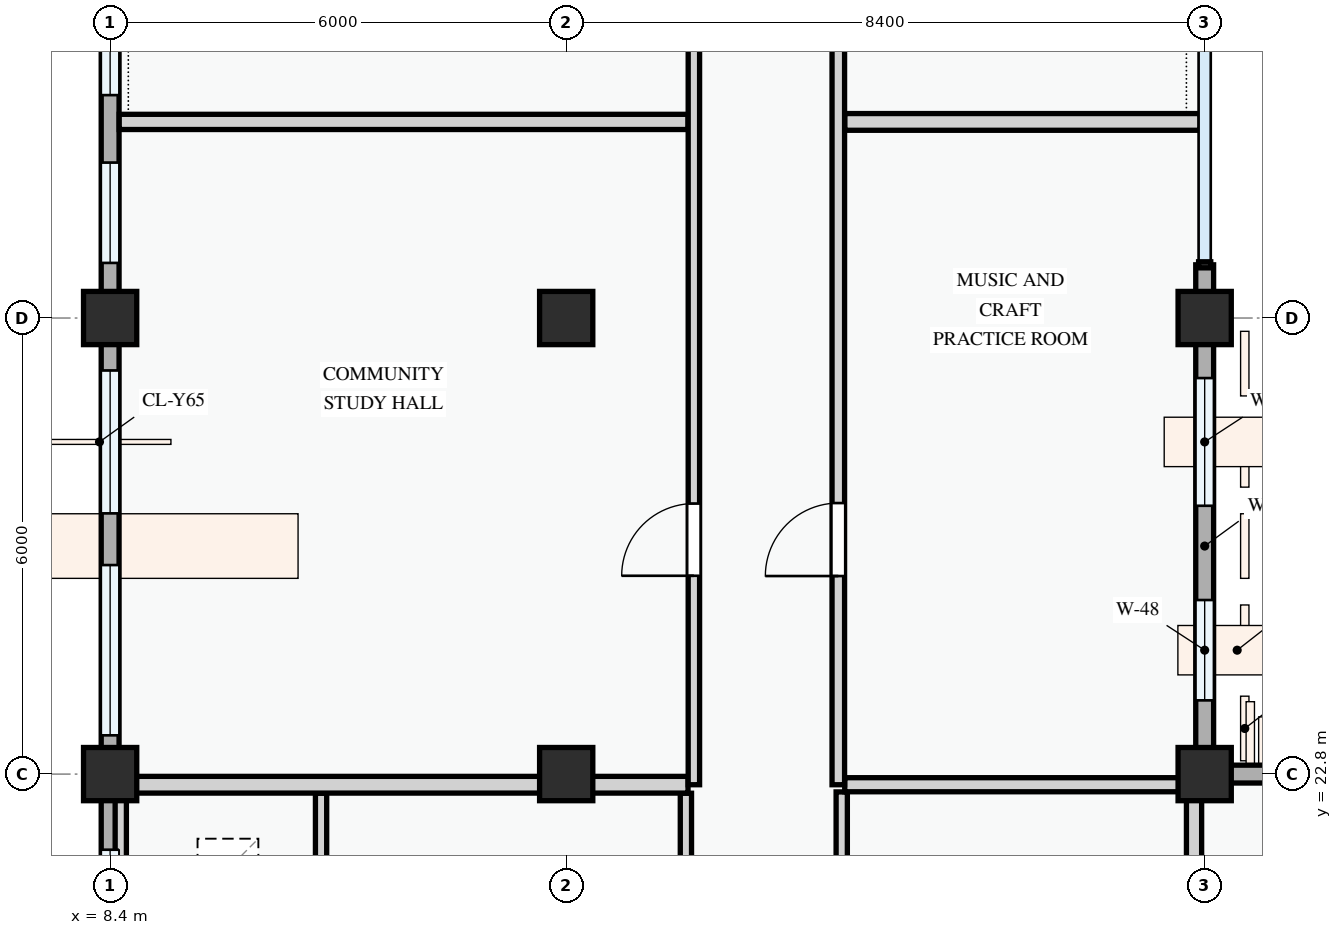
"""IFC4 building model, lengths in metres.
Left out: names, types, materials, properties, quantities, classifications, styles, units other than length and angle.
Written with IfcOpenShell. Run it as: python <this file> out.ifc"""

import sys

from ifc_helpers import new_model, si_unit, direction, frame, frame_2d, origin, origin_2d, place, context, subcontext, project, spatial, rectangle, extrude, element, fill, save


model = new_model("IFC4")
c1 = context("Model", 3, precision=1e-05, world=origin(), true_north=direction((0.0, 1.0)))
c2 = subcontext(c1, "Body", "Model", "MODEL_VIEW")
j1 = project(units=[si_unit("LENGTHUNIT", "METRE"), si_unit("PLANEANGLEUNIT", "RADIAN")], contexts=[c1])
p1 = place(None, origin())
s1 = spatial("IfcSite", under=j1, at=p1, CompositionType="ELEMENT")
p2 = place(p1, origin())
s2 = spatial("IfcBuilding", under=s1, at=p2, CompositionType="ELEMENT")
p3 = place(p2, frame((0.0, 0.0, 4.5)))
s3 = spatial("IfcBuildingStorey", under=s2, at=p3, CompositionType="ELEMENT", Elevation=4.5)
for number, where, z_axis, x_axis in (
    (1, (8.4, 22.8, 0.0), (0.0, 0.0, 1.0), (1.0, 0.0, 0.0)),
    (2, (8.4, 28.8, 0.0), (0.0, 0.0, 1.0), (1.0, 0.0, 0.0)),
    (3, (14.4, 22.8, 0.0), (0.0, 0.0, 1.0), (1.0, 0.0, 0.0)),
    (4, (14.4, 28.8, 0.0), (0.0, 0.0, 1.0), (1.0, 0.0, 0.0)),
    (5, (22.8, 22.8, 0.0), (0.0, 0.0, 1.0), (1.0, 0.0, 0.0)),
    (6, (22.8, 28.8, 0.0), (0.0, 0.0, 1.0), (1.0, 0.0, 0.0)),
):
    element("IfcColumn", number, at=place(p3, frame(where, z_axis=z_axis, x_axis=x_axis)), inside=s3, PredefinedType="COLUMN", context=c2, shape_type="SweptSolid", body=[
        extrude(rectangle(XDim=0.7, YDim=0.7, at=origin_2d()), origin(), (0.0, 0.0, 1.0), 3.6),
    ])
p4 = place(p3, frame((22.8, 22.8, 0.0), z_axis=(0.0, 0.0, 1.0), x_axis=(0.0, 1.0, 0.0)))
e7 = element("IfcWall", 7, at=p4, inside=s3, PredefinedType="STANDARD", context=c2, shape_type="SweptSolid", body=[
    extrude(rectangle(XDim=6.0, YDim=0.235, at=frame_2d((3.0, 0.0))), origin(), (0.0, 0.0, 1.0), 2.875),
])
p5 = place(p4, frame((0.97, 0.0, 0.78)))
e8 = element("IfcOpeningElement", 8, at=p5, cuts=e7, PredefinedType="OPENING", context=c2, shape_type="SweptSolid", body=[
    extrude(rectangle(XDim=1.32, YDim=1.35, at=frame_2d((0.66, 0.675))), frame((0.0, 0.127, 0.0), z_axis=(0.0, -1.0, 0.0), x_axis=(1.0, 0.0, 0.0)), (0.0, 0.0, 1.0), 0.255),
])
p6 = place(p4, frame((3.53, 0.0, 0.78)))
e9 = element("IfcOpeningElement", 9, at=p6, cuts=e7, PredefinedType="OPENING", context=c2, shape_type="SweptSolid", body=[
    extrude(rectangle(XDim=1.68, YDim=1.46, at=frame_2d((0.84, 0.73))), frame((0.0, 0.127, 0.0), z_axis=(0.0, -1.0, 0.0), x_axis=(1.0, 0.0, 0.0)), (0.0, 0.0, 1.0), 0.255),
])
p7 = place(p3, frame((22.8, 28.8, 0.0), z_axis=(0.0, 0.0, 1.0), x_axis=(0.0, 1.0, 0.0)))
e10 = element("IfcWall", 10, at=p7, inside=s3, PredefinedType="STANDARD", context=c2, shape_type="SweptSolid", body=[
    extrude(rectangle(XDim=0.7, YDim=0.235, at=frame_2d((0.35, 0.0))), origin(), (0.0, 0.0, 1.0), 2.725),
])
p8 = place(p3, frame((8.4, 37.2, 0.0), z_axis=(0.0, 0.0, 1.0), x_axis=(0.0, -1.0, 0.0)))
e11 = element("IfcWall", 11, at=p8, inside=s3, PredefinedType="STANDARD", context=c2, shape_type="SweptSolid", body=[
    extrude(rectangle(XDim=8.4, YDim=0.235, at=frame_2d((4.2, 0.0))), origin(), (0.0, 0.0, 1.0), 2.725),
])
p9 = place(p8, frame((0.722, 0.0, 0.78)))
e12 = element("IfcOpeningElement", 12, at=p9, cuts=e11, PredefinedType="OPENING", context=c2, shape_type="SweptSolid", body=[
    extrude(rectangle(XDim=1.82, YDim=1.46, at=frame_2d((0.91, 0.73))), frame((0.0, 0.127, 0.0), z_axis=(0.0, -1.0, 0.0), x_axis=(1.0, 0.0, 0.0)), (0.0, 0.0, 1.0), 0.255),
])
p10 = place(p8, frame((3.288, 0.0, 0.78)))
e13 = element("IfcOpeningElement", 13, at=p10, cuts=e11, PredefinedType="OPENING", context=c2, shape_type="SweptSolid", body=[
    extrude(rectangle(XDim=2.18, YDim=1.48, at=frame_2d((1.09, 0.74))), frame((0.0, 0.127, 0.0), z_axis=(0.0, -1.0, 0.0), x_axis=(1.0, 0.0, 0.0)), (0.0, 0.0, 1.0), 0.255),
])
p11 = place(p8, frame((6.355, 0.0, 0.78)))
e14 = element("IfcOpeningElement", 14, at=p11, cuts=e11, PredefinedType="OPENING", context=c2, shape_type="SweptSolid", body=[
    extrude(rectangle(XDim=1.32, YDim=1.35, at=frame_2d((0.66, 0.675))), frame((0.0, 0.127, 0.0), z_axis=(0.0, -1.0, 0.0), x_axis=(1.0, 0.0, 0.0)), (0.0, 0.0, 1.0), 0.255),
])
p12 = place(p3, frame((8.4, 28.8, 0.0), z_axis=(0.0, 0.0, 1.0), x_axis=(0.0, -1.0, 0.0)))
e15 = element("IfcWall", 15, at=p12, inside=s3, PredefinedType="STANDARD", context=c2, shape_type="SweptSolid", body=[
    extrude(rectangle(XDim=6.0, YDim=0.235, at=frame_2d((3.0, 0.0))), origin(), (0.0, 0.0, 1.0), 2.875),
])
p13 = place(p12, frame((0.69, 0.0, 0.78)))
e16 = element("IfcOpeningElement", 16, at=p13, cuts=e15, PredefinedType="OPENING", context=c2, shape_type="SweptSolid", body=[
    extrude(rectangle(XDim=1.88, YDim=1.52, at=frame_2d((0.94, 0.76))), frame((0.0, 0.127, 0.0), z_axis=(0.0, -1.0, 0.0), x_axis=(1.0, 0.0, 0.0)), (0.0, 0.0, 1.0), 0.255),
])
p14 = place(p12, frame((3.25, 0.0, 0.78)))
e17 = element("IfcOpeningElement", 17, at=p14, cuts=e15, PredefinedType="OPENING", context=c2, shape_type="SweptSolid", body=[
    extrude(rectangle(XDim=2.24, YDim=1.52, at=frame_2d((1.12, 0.76))), frame((0.0, 0.127, 0.0), z_axis=(0.0, -1.0, 0.0), x_axis=(1.0, 0.0, 0.0)), (0.0, 0.0, 1.0), 0.255),
])
p15 = place(p3, frame((8.4, 22.8, 0.0), z_axis=(0.0, 0.0, 1.0), x_axis=(0.0, -1.0, 0.0)))
e18 = element("IfcWall", 18, at=p15, inside=s3, PredefinedType="STANDARD", context=c2, shape_type="SweptSolid", body=[
    extrude(rectangle(XDim=8.4, YDim=0.235, at=frame_2d((4.2, 0.0))), origin(), (0.0, 0.0, 1.0), 2.725),
])
p16 = place(p15, frame((0.995, 0.0, 0.78)))
e19 = element("IfcOpeningElement", 19, at=p16, cuts=e18, PredefinedType="OPENING", context=c2, shape_type="SweptSolid", body=[
    extrude(rectangle(XDim=2.4, YDim=1.65, at=frame_2d((1.2, 0.825))), frame((0.0, 0.127, 0.0), z_axis=(0.0, -1.0, 0.0), x_axis=(1.0, 0.0, 0.0)), (0.0, 0.0, 1.0), 0.255),
])
p17 = place(p15, frame((4.952, 0.0, 0.78)))
e20 = element("IfcOpeningElement", 20, at=p17, cuts=e18, PredefinedType="OPENING", context=c2, shape_type="SweptSolid", body=[
    extrude(rectangle(XDim=1.42, YDim=1.38, at=frame_2d((0.71, 0.69))), frame((0.0, 0.127, 0.0), z_axis=(0.0, -1.0, 0.0), x_axis=(1.0, 0.0, 0.0)), (0.0, 0.0, 1.0), 0.255),
])
p18 = place(p3, frame((28.8, 22.8, 0.0), z_axis=(0.0, 0.0, 1.0), x_axis=(-1.0, 0.0, 0.0)))
e21 = element("IfcWall", 21, at=p18, inside=s3, PredefinedType="STANDARD", context=c2, shape_type="SweptSolid", body=[
    extrude(rectangle(XDim=6.0, YDim=0.235, at=frame_2d((3.0, 0.0))), origin(), (0.0, 0.0, 1.0), 2.775),
])
p19 = place(p18, frame((0.955, 0.0, 0.78)))
e22 = element("IfcOpeningElement", 22, at=p19, cuts=e21, PredefinedType="OPENING", context=c2, shape_type="SweptSolid", body=[
    extrude(rectangle(XDim=1.35, YDim=1.55, at=frame_2d((0.675, 0.775))), frame((0.0, 0.127, 0.0), z_axis=(0.0, -1.0, 0.0), x_axis=(1.0, 0.0, 0.0)), (0.0, 0.0, 1.0), 0.255),
])
p20 = place(p18, frame((3.57, 0.0, 0.78)))
e23 = element("IfcOpeningElement", 23, at=p20, cuts=e21, PredefinedType="OPENING", context=c2, shape_type="SweptSolid", body=[
    extrude(rectangle(XDim=1.6, YDim=1.75, at=frame_2d((0.8, 0.875))), frame((0.0, 0.127, 0.0), z_axis=(0.0, -1.0, 0.0), x_axis=(1.0, 0.0, 0.0)), (0.0, 0.0, 1.0), 0.255),
])
p21 = place(p3, frame((8.54, 18.676, 0.0), z_axis=(0.0, 0.0, 1.0), x_axis=(0.0, 1.0, 0.0)))
e24 = element("IfcWall", 24, at=p21, inside=s3, PredefinedType="PARTITIONING", context=c2, shape_type="SweptSolid", body=[
    extrude(rectangle(XDim=3.872, YDim=0.148, at=frame_2d((1.936, 0.0))), origin(), (0.0, 0.0, 1.0), 2.725),
])
for number, where, z_axis, x_axis in (
    (25, (11.175, 18.676, 0.0), (0.0, 0.0, 1.0), (0.0, 1.0, 0.0)),
    (26, (15.975, 18.676, 0.0), (0.0, 0.0, 1.0), (0.0, 1.0, 0.0)),
):
    element("IfcWall", number, at=place(p3, frame(where, z_axis=z_axis, x_axis=x_axis)), inside=s3, PredefinedType="PARTITIONING", context=c2, shape_type="SweptSolid", body=[
        extrude(rectangle(XDim=3.872, YDim=0.148, at=frame_2d((1.936, 0.0))), origin(), (0.0, 0.0, 1.0), 3.3),
    ])
p22 = place(p3, frame((18.025, 18.676, 0.0), z_axis=(0.0, 0.0, 1.0), x_axis=(0.0, 1.0, 0.0)))
e27 = element("IfcWall", 27, at=p22, inside=s3, PredefinedType="PARTITIONING", context=c2, shape_type="SweptSolid", body=[
    extrude(rectangle(XDim=3.889, YDim=0.148, at=frame_2d((1.945, 0.0))), origin(), (0.0, 0.0, 1.0), 3.3),
])
p23 = place(p3, frame((8.52, 22.66, 0.0), z_axis=(0.0, 0.0, 1.0), x_axis=(1.0, 0.0, 0.0)))
e28 = element("IfcWall", 28, at=p23, inside=s3, PredefinedType="PARTITIONING", context=c2, shape_type="SweptSolid", body=[
    extrude(rectangle(XDim=7.483, YDim=0.22, at=frame_2d((3.742, 0.0))), origin(), (0.0, 0.0, 1.0), 2.675),
])
p24 = place(p3, frame((18.064, 22.66, 0.0), z_axis=(0.0, 0.0, 1.0), x_axis=(1.0, 0.0, 0.0)))
e29 = element("IfcWall", 29, at=p24, inside=s3, PredefinedType="PARTITIONING", context=c2, shape_type="SweptSolid", body=[
    extrude(rectangle(XDim=4.494, YDim=0.185, at=frame_2d((2.247, 0.0))), origin(), (0.0, 0.0, 1.0), 2.675),
])
p25 = place(p3, frame((8.52, 31.38, 0.0), z_axis=(0.0, 0.0, 1.0), x_axis=(1.0, 0.0, 0.0)))
e30 = element("IfcWall", 30, at=p25, inside=s3, PredefinedType="PARTITIONING", context=c2, shape_type="SweptSolid", body=[
    extrude(rectangle(XDim=7.483, YDim=0.2, at=frame_2d((3.742, 0.0))), origin(), (0.0, 0.0, 1.0), 3.3),
])
p26 = place(p3, frame((18.064, 31.38, 0.0), z_axis=(0.0, 0.0, 1.0), x_axis=(1.0, 0.0, 0.0)))
e31 = element("IfcWall", 31, at=p26, inside=s3, PredefinedType="PARTITIONING", context=c2, shape_type="SweptSolid", body=[
    extrude(rectangle(XDim=4.676, YDim=0.22, at=frame_2d((2.338, 0.0))), origin(), (0.0, 0.0, 1.0), 3.3),
])
p27 = place(p3, frame((16.08, 22.66, 0.0), z_axis=(0.0, 0.0, 1.0), x_axis=(0.0, 1.0, 0.0)))
e32 = element("IfcWall", 32, at=p27, inside=s3, PredefinedType="PARTITIONING", context=c2, shape_type="SweptSolid", body=[
    extrude(rectangle(XDim=34.821, YDim=0.15, at=frame_2d((17.41, 0.0))), origin(), (0.0, 0.0, 1.0), 3.3),
])
p28 = place(p27, frame((2.749, 0.0, 0.0)))
e33 = element("IfcOpeningElement", 33, at=p28, cuts=e32, PredefinedType="OPENING", context=c2, shape_type="SweptSolid", body=[
    extrude(rectangle(XDim=0.95, YDim=2.1, at=frame_2d((0.475, 1.05))), frame((0.0, 0.085, 0.0), z_axis=(0.0, -1.0, 0.0), x_axis=(1.0, 0.0, 0.0)), (0.0, 0.0, 1.0), 0.17),
])
p29 = place(p27, frame((9.966, 0.0, 0.0)))
e34 = element("IfcOpeningElement", 34, at=p29, cuts=e32, PredefinedType="OPENING", context=c2, shape_type="SweptSolid", body=[
    extrude(rectangle(XDim=0.95, YDim=2.1, at=frame_2d((0.475, 1.05))), frame((0.0, 0.085, 0.0), z_axis=(0.0, -1.0, 0.0), x_axis=(1.0, 0.0, 0.0)), (0.0, 0.0, 1.0), 0.17),
])
p30 = place(p27, frame((24.343, 0.0, 0.0)))
e35 = element("IfcOpeningElement", 35, at=p30, cuts=e32, PredefinedType="OPENING", context=c2, shape_type="SweptSolid", body=[
    extrude(rectangle(XDim=0.95, YDim=2.1, at=frame_2d((0.475, 1.05))), frame((0.0, 0.085, 0.0), z_axis=(0.0, -1.0, 0.0), x_axis=(1.0, 0.0, 0.0)), (0.0, 0.0, 1.0), 0.17),
])
p31 = place(p27, frame((31.542, 0.0, 0.0)))
e36 = element("IfcOpeningElement", 36, at=p31, cuts=e32, PredefinedType="OPENING", context=c2, shape_type="SweptSolid", body=[
    extrude(rectangle(XDim=0.95, YDim=2.1, at=frame_2d((0.475, 1.05))), frame((0.0, 0.085, 0.0), z_axis=(0.0, -1.0, 0.0), x_axis=(1.0, 0.0, 0.0)), (0.0, 0.0, 1.0), 0.17),
])
p32 = place(p3, frame((17.98, 22.66, 0.0), z_axis=(0.0, 0.0, 1.0), x_axis=(0.0, 1.0, 0.0)))
e37 = element("IfcWall", 37, at=p32, inside=s3, PredefinedType="PARTITIONING", context=c2, shape_type="SweptSolid", body=[
    extrude(rectangle(XDim=34.821, YDim=0.165, at=frame_2d((17.41, 0.0))), origin(), (0.0, 0.0, 1.0), 3.3),
])
p33 = place(p32, frame((2.746, 0.0, 0.0)))
e38 = element("IfcOpeningElement", 38, at=p33, cuts=e37, PredefinedType="OPENING", context=c2, shape_type="SweptSolid", body=[
    extrude(rectangle(XDim=0.96, YDim=2.12, at=frame_2d((0.48, 1.06))), frame((0.0, 0.093, 0.0), z_axis=(0.0, -1.0, 0.0), x_axis=(1.0, 0.0, 0.0)), (0.0, 0.0, 1.0), 0.185),
])
p34 = place(p32, frame((9.965, 0.0, 0.0)))
e39 = element("IfcOpeningElement", 39, at=p34, cuts=e37, PredefinedType="OPENING", context=c2, shape_type="SweptSolid", body=[
    extrude(rectangle(XDim=0.92, YDim=2.1, at=frame_2d((0.46, 1.05))), frame((0.0, 0.093, 0.0), z_axis=(0.0, -1.0, 0.0), x_axis=(1.0, 0.0, 0.0)), (0.0, 0.0, 1.0), 0.185),
])
p35 = place(p32, frame((24.335, 0.0, 0.0)))
e40 = element("IfcOpeningElement", 40, at=p35, cuts=e37, PredefinedType="OPENING", context=c2, shape_type="SweptSolid", body=[
    extrude(rectangle(XDim=0.92, YDim=2.1, at=frame_2d((0.46, 1.05))), frame((0.0, 0.093, 0.0), z_axis=(0.0, -1.0, 0.0), x_axis=(1.0, 0.0, 0.0)), (0.0, 0.0, 1.0), 0.185),
])
p36 = place(p32, frame((31.535, 0.0, 0.0)))
e41 = element("IfcOpeningElement", 41, at=p36, cuts=e37, PredefinedType="OPENING", context=c2, shape_type="SweptSolid", body=[
    extrude(rectangle(XDim=0.92, YDim=2.1, at=frame_2d((0.46, 1.05))), frame((0.0, 0.093, 0.0), z_axis=(0.0, -1.0, 0.0), x_axis=(1.0, 0.0, 0.0)), (0.0, 0.0, 1.0), 0.185),
])
p37 = place(p3, frame((22.66, 18.064, 0.0), z_axis=(0.0, 0.0, 1.0), x_axis=(0.0, 1.0, 0.0)))
e42 = element("IfcWall", 42, at=p37, inside=s3, PredefinedType="PARTITIONING", context=c2, shape_type="SweptSolid", body=[
    extrude(rectangle(XDim=4.676, YDim=0.2, at=frame_2d((2.338, 0.0))), origin(), (0.0, 0.0, 1.0), 2.725),
])
p38 = place(p5, origin())
e43 = element("IfcWindow", 43, at=p38, inside=s3, PartitioningType="SINGLE_PANEL", PredefinedType="WINDOW", context=c2, shape_type="SweptSolid", body=[
    extrude(rectangle(XDim=1.32, YDim=1.35, at=frame_2d((0.66, 0.675))), frame((0.0, 0.03, 0.0), z_axis=(0.0, -1.0, 0.0), x_axis=(1.0, 0.0, 0.0)), (0.0, 0.0, 1.0), 0.06),
])
fill(e8, e43)
p39 = place(p6, origin())
e44 = element("IfcWindow", 44, at=p39, inside=s3, PartitioningType="DOUBLE_PANEL_VERTICAL", PredefinedType="WINDOW", context=c2, shape_type="SweptSolid", body=[
    extrude(rectangle(XDim=1.68, YDim=1.46, at=frame_2d((0.84, 0.73))), frame((0.0, 0.03, 0.0), z_axis=(0.0, -1.0, 0.0), x_axis=(1.0, 0.0, 0.0)), (0.0, 0.0, 1.0), 0.06),
])
fill(e9, e44)
p40 = place(p10, origin())
e45 = element("IfcWindow", 45, at=p40, inside=s3, PartitioningType="DOUBLE_PANEL_VERTICAL", PredefinedType="WINDOW", context=c2, shape_type="SweptSolid", body=[
    extrude(rectangle(XDim=2.18, YDim=1.48, at=frame_2d((1.09, 0.74))), frame((0.0, 0.03, 0.0), z_axis=(0.0, -1.0, 0.0), x_axis=(1.0, 0.0, 0.0)), (0.0, 0.0, 1.0), 0.06),
])
fill(e13, e45)
p41 = place(p11, origin())
e46 = element("IfcWindow", 46, at=p41, inside=s3, PartitioningType="SINGLE_PANEL", PredefinedType="WINDOW", context=c2, shape_type="SweptSolid", body=[
    extrude(rectangle(XDim=1.32, YDim=1.35, at=frame_2d((0.66, 0.675))), frame((0.0, 0.03, 0.0), z_axis=(0.0, -1.0, 0.0), x_axis=(1.0, 0.0, 0.0)), (0.0, 0.0, 1.0), 0.06),
])
fill(e14, e46)
p42 = place(p13, origin())
e47 = element("IfcWindow", 47, at=p42, inside=s3, PartitioningType="DOUBLE_PANEL_VERTICAL", PredefinedType="WINDOW", context=c2, shape_type="SweptSolid", body=[
    extrude(rectangle(XDim=1.88, YDim=1.52, at=frame_2d((0.94, 0.76))), frame((0.0, 0.03, 0.0), z_axis=(0.0, -1.0, 0.0), x_axis=(1.0, 0.0, 0.0)), (0.0, 0.0, 1.0), 0.06),
])
fill(e16, e47)
p43 = place(p14, origin())
e48 = element("IfcWindow", 48, at=p43, inside=s3, PartitioningType="DOUBLE_PANEL_VERTICAL", PredefinedType="WINDOW", context=c2, shape_type="SweptSolid", body=[
    extrude(rectangle(XDim=2.24, YDim=1.52, at=frame_2d((1.12, 0.76))), frame((0.0, 0.03, 0.0), z_axis=(0.0, -1.0, 0.0), x_axis=(1.0, 0.0, 0.0)), (0.0, 0.0, 1.0), 0.06),
])
fill(e17, e48)
p44 = place(p16, origin())
e49 = element("IfcWindow", 49, at=p44, inside=s3, PartitioningType="DOUBLE_PANEL_VERTICAL", PredefinedType="WINDOW", context=c2, shape_type="SweptSolid", body=[
    extrude(rectangle(XDim=2.4, YDim=1.65, at=frame_2d((1.2, 0.825))), frame((0.0, 0.03, 0.0), z_axis=(0.0, -1.0, 0.0), x_axis=(1.0, 0.0, 0.0)), (0.0, 0.0, 1.0), 0.06),
])
fill(e19, e49)
p45 = place(p28, origin())
e50 = element("IfcDoor", 50, at=p45, inside=s3, OperationType="SINGLE_SWING_LEFT", PredefinedType="DOOR", context=c2, shape_type="SweptSolid", body=[
    extrude(rectangle(XDim=0.95, YDim=2.1, at=frame_2d((0.475, 1.05))), frame((0.0, 0.025, 0.0), z_axis=(0.0, -1.0, 0.0), x_axis=(1.0, 0.0, 0.0)), (0.0, 0.0, 1.0), 0.05),
])
fill(e33, e50)
p46 = place(p33, origin())
e51 = element("IfcDoor", 51, at=p46, inside=s3, OperationType="SINGLE_SWING_LEFT", PredefinedType="DOOR", context=c2, shape_type="SweptSolid", body=[
    extrude(rectangle(XDim=0.96, YDim=2.12, at=frame_2d((0.48, 1.06))), frame((0.0, 0.025, 0.0), z_axis=(0.0, -1.0, 0.0), x_axis=(1.0, 0.0, 0.0)), (0.0, 0.0, 1.0), 0.05),
])
fill(e38, e51)
save(model, sys.argv[1])
